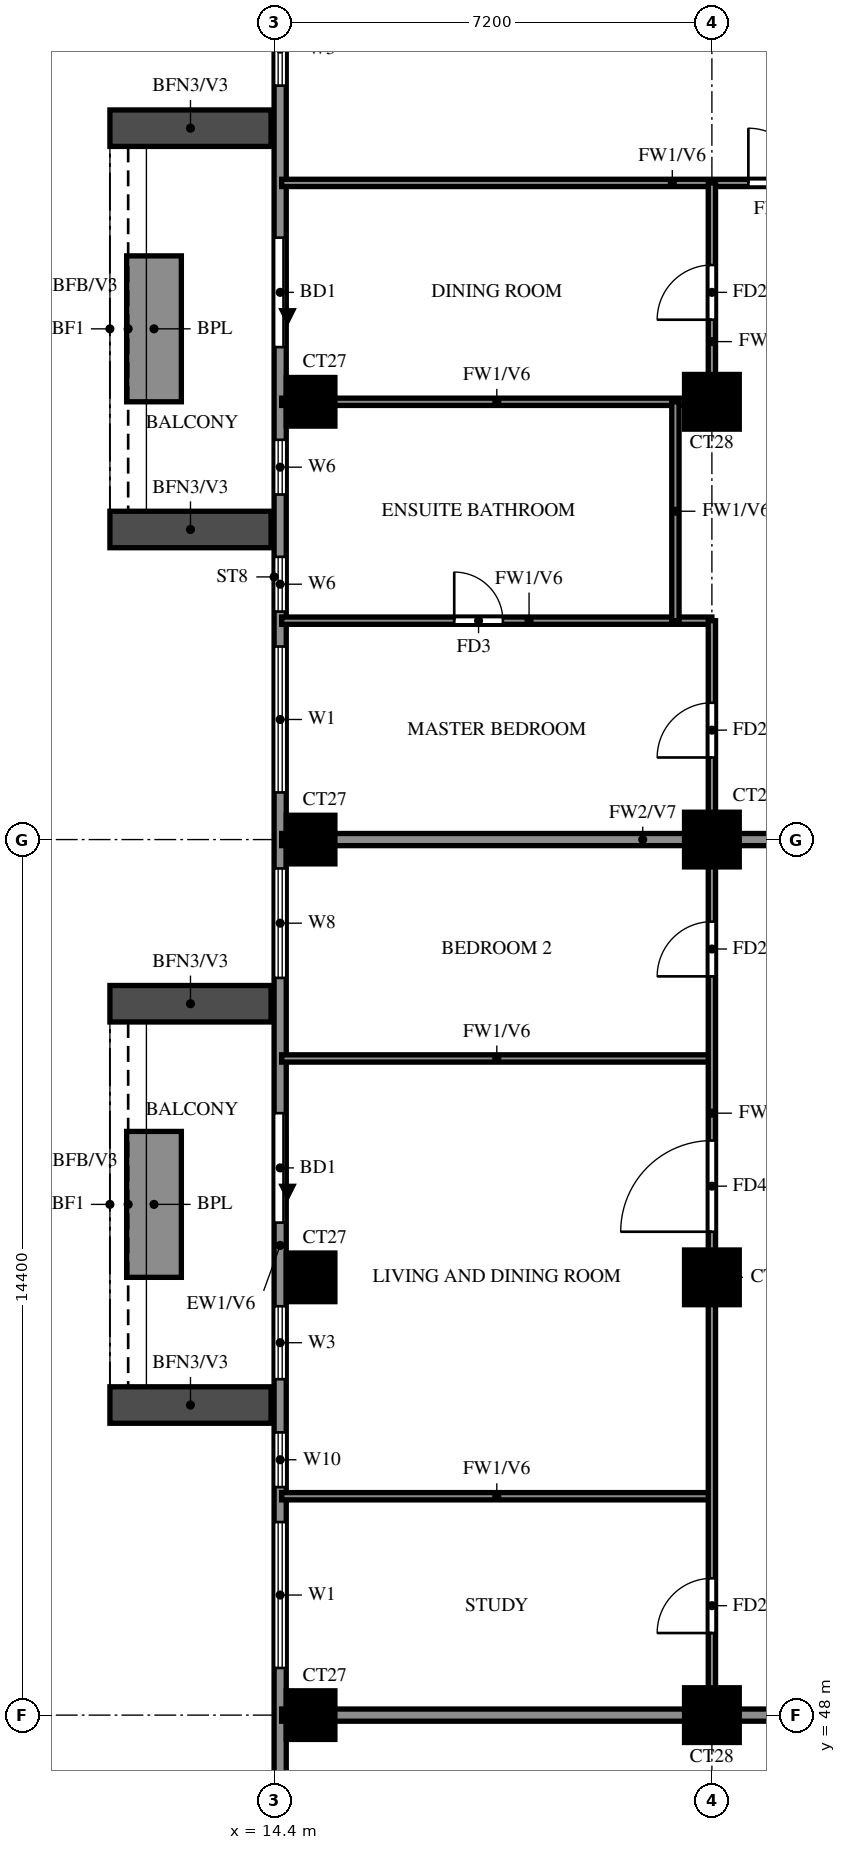
"""IFC4 building model, lengths in metres.
Left out: names, types, materials, properties, quantities, classifications, styles, units other than length and angle.
Written with IfcOpenShell. Run it as: python <this file> out.ifc"""

import sys

from ifc_helpers import new_model, si_unit, direction, frame, frame_2d, origin, origin_2d, place, context, subcontext, project, spatial, rectangle, extrude, source, transform, mapped, element, fill, save


model = new_model("IFC4")
c1 = context("Model", 3, precision=1e-05, world=origin(), true_north=direction((0.0, 1.0)))
c2 = subcontext(c1, "Body", "Model", "MODEL_VIEW")
j1 = project(units=[si_unit("LENGTHUNIT", "METRE"), si_unit("PLANEANGLEUNIT", "RADIAN")], contexts=[c1])
p1 = place(None, origin())
s1 = spatial("IfcSite", under=j1, at=p1, CompositionType="ELEMENT")
p2 = place(p1, origin())
s2 = spatial("IfcBuilding", under=s1, at=p2, CompositionType="ELEMENT")
p3 = place(p2, frame((0.0, 0.0, 202.5)))
s3 = spatial("IfcBuildingStorey", under=s2, at=p3, CompositionType="ELEMENT", Elevation=202.5)
m1 = source(origin(), c2, "Body", "SweptSolid", [
    extrude(rectangle(XDim=0.8, YDim=0.8, at=origin_2d()), origin(), (0.0, 0.0, 1.0), 3.1),
])
p4 = place(p3, frame((15.0, 48.0, 0.0), z_axis=(0.0, 0.0, 1.0), x_axis=(1.0, 0.0, 0.0)))
e1 = element("IfcColumn", 1, at=p4, inside=s3, PredefinedType="COLUMN", context=c2, shape_type="MappedRepresentation", body=[
    mapped(m1, transform((0.0, 0.0, 0.0))),
])
m2 = source(origin(), c2, "Body", "SweptSolid", [
    extrude(rectangle(XDim=0.9, YDim=0.9, at=origin_2d()), origin(), (0.0, 0.0, 1.0), 3.1),
])
p5 = place(p3, frame((21.6, 48.0, 0.0), z_axis=(0.0, 0.0, 1.0), x_axis=(1.0, 0.0, 0.0)))
e2 = element("IfcColumn", 2, at=p5, inside=s3, PredefinedType="COLUMN", context=c2, shape_type="MappedRepresentation", body=[
    mapped(m2, transform((0.0, 0.0, 0.0))),
])
p6 = place(p3, frame((15.0, 55.2, 0.0), z_axis=(0.0, 0.0, 1.0), x_axis=(1.0, 0.0, 0.0)))
e3 = element("IfcColumn", 3, at=p6, inside=s3, PredefinedType="COLUMN", context=c2, shape_type="MappedRepresentation", body=[
    mapped(m1, transform((0.0, 0.0, 0.0))),
])
p7 = place(p3, frame((21.6, 55.2, 0.0), z_axis=(0.0, 0.0, 1.0), x_axis=(1.0, 0.0, 0.0)))
e4 = element("IfcColumn", 4, at=p7, inside=s3, PredefinedType="COLUMN", context=c2, shape_type="MappedRepresentation", body=[
    mapped(m2, transform((0.0, 0.0, 0.0))),
])
p8 = place(p3, frame((15.0, 62.4, 0.0), z_axis=(0.0, 0.0, 1.0), x_axis=(1.0, 0.0, 0.0)))
e5 = element("IfcColumn", 5, at=p8, inside=s3, PredefinedType="COLUMN", context=c2, shape_type="MappedRepresentation", body=[
    mapped(m1, transform((0.0, 0.0, 0.0))),
])
p9 = place(p3, frame((21.6, 62.4, 0.0), z_axis=(0.0, 0.0, 1.0), x_axis=(1.0, 0.0, 0.0)))
e6 = element("IfcColumn", 6, at=p9, inside=s3, PredefinedType="COLUMN", context=c2, shape_type="MappedRepresentation", body=[
    mapped(m2, transform((0.0, 0.0, 0.0))),
])
p10 = place(p3, frame((15.0, 69.6, 0.0), z_axis=(0.0, 0.0, 1.0), x_axis=(1.0, 0.0, 0.0)))
e7 = element("IfcColumn", 7, at=p10, inside=s3, PredefinedType="COLUMN", context=c2, shape_type="MappedRepresentation", body=[
    mapped(m1, transform((0.0, 0.0, 0.0))),
])
p11 = place(p3, frame((21.6, 69.6, 0.0), z_axis=(0.0, 0.0, 1.0), x_axis=(1.0, 0.0, 0.0)))
e8 = element("IfcColumn", 8, at=p11, inside=s3, PredefinedType="COLUMN", context=c2, shape_type="MappedRepresentation", body=[
    mapped(m2, transform((0.0, 0.0, 0.0))),
])
p12 = place(p3, frame((14.5, 76.6, 0.0), z_axis=(0.0, 0.0, 1.0), x_axis=(0.0, -1.0, 0.0)))
e9 = element("IfcWall", 9, at=p12, inside=s3, PredefinedType="SOLIDWALL", context=c2, shape_type="SweptSolid", body=[
    extrude(rectangle(XDim=33.4, YDim=0.2, at=frame_2d((16.7, 0.0))), origin(), (0.0, 0.0, 1.0), 3.1),
])
p13 = place(p12, frame((4.3, 0.0, 0.0)))
e10 = element("IfcOpeningElement", 10, at=p13, cuts=e9, PredefinedType="OPENING", context=c2, shape_type="SweptSolid", body=[
    extrude(rectangle(XDim=1.8, YDim=2.4, at=frame_2d((0.9, 1.2))), frame((0.0, 0.11, 0.0), z_axis=(0.0, -1.0, 0.0), x_axis=(1.0, 0.0, 0.0)), (0.0, 0.0, 1.0), 0.22),
])
p14 = place(p12, frame((18.7, 0.0, 0.0)))
e11 = element("IfcOpeningElement", 11, at=p14, cuts=e9, PredefinedType="OPENING", context=c2, shape_type="SweptSolid", body=[
    extrude(rectangle(XDim=1.8, YDim=2.4, at=frame_2d((0.9, 1.2))), frame((0.0, 0.11, 0.0), z_axis=(0.0, -1.0, 0.0), x_axis=(1.0, 0.0, 0.0)), (0.0, 0.0, 1.0), 0.22),
])
p15 = place(p12, frame((29.875, 0.0, 0.6)))
e12 = element("IfcOpeningElement", 12, at=p15, cuts=e9, PredefinedType="OPENING", context=c2, shape_type="SweptSolid", body=[
    extrude(rectangle(XDim=2.4, YDim=2.4, at=frame_2d((1.2, 1.2))), frame((0.0, 0.11, 0.0), z_axis=(0.0, -1.0, 0.0), x_axis=(1.0, 0.0, 0.0)), (0.0, 0.0, 1.0), 0.22),
])
p16 = place(p12, frame((25.425, 0.0, 0.6)))
e13 = element("IfcOpeningElement", 13, at=p16, cuts=e9, PredefinedType="OPENING", context=c2, shape_type="SweptSolid", body=[
    extrude(rectangle(XDim=2.4, YDim=2.4, at=frame_2d((1.2, 1.2))), frame((0.0, 0.11, 0.0), z_axis=(0.0, -1.0, 0.0), x_axis=(1.0, 0.0, 0.0)), (0.0, 0.0, 1.0), 0.22),
])
p17 = place(p12, frame((21.875, 0.0, 0.6)))
e14 = element("IfcOpeningElement", 14, at=p17, cuts=e9, PredefinedType="OPENING", context=c2, shape_type="SweptSolid", body=[
    extrude(rectangle(XDim=1.2, YDim=2.4, at=frame_2d((0.6, 1.2))), frame((0.0, 0.11, 0.0), z_axis=(0.0, -1.0, 0.0), x_axis=(1.0, 0.0, 0.0)), (0.0, 0.0, 1.0), 0.22),
])
p18 = place(p12, frame((23.95, 0.0, 0.6)))
e15 = element("IfcOpeningElement", 15, at=p18, cuts=e9, PredefinedType="OPENING", context=c2, shape_type="SweptSolid", body=[
    extrude(rectangle(XDim=0.9, YDim=2.4, at=frame_2d((0.45, 1.2))), frame((0.0, 0.11, 0.0), z_axis=(0.0, -1.0, 0.0), x_axis=(1.0, 0.0, 0.0)), (0.0, 0.0, 1.0), 0.22),
])
p19 = place(p12, frame((14.675, 0.0, 0.6)))
e16 = element("IfcOpeningElement", 16, at=p19, cuts=e9, PredefinedType="OPENING", context=c2, shape_type="SweptSolid", body=[
    extrude(rectangle(XDim=1.8, YDim=2.4, at=frame_2d((0.9, 1.2))), frame((0.0, 0.11, 0.0), z_axis=(0.0, -1.0, 0.0), x_axis=(1.0, 0.0, 0.0)), (0.0, 0.0, 1.0), 0.22),
])
p20 = place(p12, frame((11.025, 0.0, 0.6)))
e17 = element("IfcOpeningElement", 17, at=p20, cuts=e9, PredefinedType="OPENING", context=c2, shape_type="SweptSolid", body=[
    extrude(rectangle(XDim=2.4, YDim=2.4, at=frame_2d((1.2, 1.2))), frame((0.0, 0.11, 0.0), z_axis=(0.0, -1.0, 0.0), x_axis=(1.0, 0.0, 0.0)), (0.0, 0.0, 1.0), 0.22),
])
p21 = place(p12, frame((7.625, 0.0, 1.5)))
e18 = element("IfcOpeningElement", 18, at=p21, cuts=e9, PredefinedType="OPENING", context=c2, shape_type="SweptSolid", body=[
    extrude(rectangle(XDim=0.9, YDim=0.9, at=frame_2d((0.45, 0.45))), frame((0.0, 0.11, 0.0), z_axis=(0.0, -1.0, 0.0), x_axis=(1.0, 0.0, 0.0)), (0.0, 0.0, 1.0), 0.22),
])
p22 = place(p12, frame((9.55, 0.0, 1.5)))
e19 = element("IfcOpeningElement", 19, at=p22, cuts=e9, PredefinedType="OPENING", context=c2, shape_type="SweptSolid", body=[
    extrude(rectangle(XDim=0.9, YDim=0.9, at=frame_2d((0.45, 0.45))), frame((0.0, 0.11, 0.0), z_axis=(0.0, -1.0, 0.0), x_axis=(1.0, 0.0, 0.0)), (0.0, 0.0, 1.0), 0.22),
])
p23 = place(p12, frame((0.6, 0.0, 0.6)))
e20 = element("IfcOpeningElement", 20, at=p23, cuts=e9, PredefinedType="OPENING", context=c2, shape_type="SweptSolid", body=[
    extrude(rectangle(XDim=1.2, YDim=2.4, at=frame_2d((0.6, 1.2))), frame((0.0, 0.11, 0.0), z_axis=(0.0, -1.0, 0.0), x_axis=(1.0, 0.0, 0.0)), (0.0, 0.0, 1.0), 0.22),
])
for number, where, z_axis, x_axis in (
    (21, (14.35, 74.1, 0.0), (0.0, 0.0, 1.0), (-1.0, 0.0, 0.0)),
    (22, (14.35, 67.5, 0.0), (0.0, 0.0, 1.0), (-1.0, 0.0, 0.0)),
):
    element("IfcWall", number, at=place(p3, frame(where, z_axis=z_axis, x_axis=x_axis)), inside=s3, PredefinedType="SOLIDWALL", context=c2, shape_type="SweptSolid", body=[
        extrude(rectangle(XDim=2.65, YDim=0.6, at=frame_2d((1.325, 0.0))), origin(), (0.0, 0.0, 1.0), 2.75),
    ])
p24 = place(p3, frame((12.425, 72.0, 0.0), z_axis=(0.0, 0.0, 1.0), x_axis=(0.0, -1.0, 0.0)))
e23 = element("IfcWall", 23, at=p24, inside=s3, PredefinedType="SOLIDWALL", context=c2, shape_type="SweptSolid", body=[
    extrude(rectangle(XDim=2.4, YDim=0.9, at=frame_2d((1.2, 0.0))), origin(), (0.0, 0.0, 1.0), 0.9),
])
for number, where, z_axis, x_axis in (
    (24, (14.35, 59.7, 0.0), (0.0, 0.0, 1.0), (-1.0, 0.0, 0.0)),
    (25, (14.35, 53.1, 0.0), (0.0, 0.0, 1.0), (-1.0, 0.0, 0.0)),
):
    element("IfcWall", number, at=place(p3, frame(where, z_axis=z_axis, x_axis=x_axis)), inside=s3, PredefinedType="SOLIDWALL", context=c2, shape_type="SweptSolid", body=[
        extrude(rectangle(XDim=2.65, YDim=0.6, at=frame_2d((1.325, 0.0))), origin(), (0.0, 0.0, 1.0), 2.75),
    ])
p25 = place(p3, frame((12.425, 57.6, 0.0), z_axis=(0.0, 0.0, 1.0), x_axis=(0.0, -1.0, 0.0)))
e26 = element("IfcWall", 26, at=p25, inside=s3, PredefinedType="SOLIDWALL", context=c2, shape_type="SweptSolid", body=[
    extrude(rectangle(XDim=2.4, YDim=0.9, at=frame_2d((1.2, 0.0))), origin(), (0.0, 0.0, 1.0), 0.9),
])
p26 = place(p3, frame((14.525, 48.0, 0.0), z_axis=(0.0, 0.0, 1.0), x_axis=(1.0, 0.0, 0.0)))
e27 = element("IfcWall", 27, at=p26, inside=s3, PredefinedType="SOLIDWALL", context=c2, shape_type="SweptSolid", body=[
    extrude(rectangle(XDim=19.075, YDim=0.2, at=frame_2d((9.538, 0.0))), origin(), (0.0, 0.0, 1.0), 3.1),
])
p27 = place(p3, frame((14.525, 62.4, 0.0), z_axis=(0.0, 0.0, 1.0), x_axis=(1.0, 0.0, 0.0)))
e28 = element("IfcWall", 28, at=p27, inside=s3, PredefinedType="SOLIDWALL", context=c2, shape_type="SweptSolid", body=[
    extrude(rectangle(XDim=11.875, YDim=0.2, at=frame_2d((5.938, 0.0))), origin(), (0.0, 0.0, 1.0), 3.1),
])
for number, where, z_axis, x_axis in (
    (29, (14.525, 51.6, 0.0), (0.0, 0.0, 1.0), (1.0, 0.0, 0.0)),
    (30, (14.525, 58.8, 0.0), (0.0, 0.0, 1.0), (1.0, 0.0, 0.0)),
):
    element("IfcWall", number, at=place(p3, frame(where, z_axis=z_axis, x_axis=x_axis)), inside=s3, PredefinedType="PARTITIONING", context=c2, shape_type="SweptSolid", body=[
        extrude(rectangle(XDim=7.075, YDim=0.12, at=frame_2d((3.538, 0.0))), origin(), (0.0, 0.0, 1.0), 3.1),
    ])
p28 = place(p3, frame((14.525, 66.0, 0.0), z_axis=(0.0, 0.0, 1.0), x_axis=(1.0, 0.0, 0.0)))
e31 = element("IfcWall", 31, at=p28, inside=s3, PredefinedType="PARTITIONING", context=c2, shape_type="SweptSolid", body=[
    extrude(rectangle(XDim=7.075, YDim=0.12, at=frame_2d((3.538, 0.0))), origin(), (0.0, 0.0, 1.0), 3.1),
])
p29 = place(p28, frame((2.837, 0.0, 0.0)))
e32 = element("IfcOpeningElement", 32, at=p29, cuts=e31, PredefinedType="OPENING", context=c2, shape_type="SweptSolid", body=[
    extrude(rectangle(XDim=0.8, YDim=2.1, at=frame_2d((0.4, 1.05))), frame((0.0, 0.07, 0.0), z_axis=(0.0, -1.0, 0.0), x_axis=(1.0, 0.0, 0.0)), (0.0, 0.0, 1.0), 0.14),
])
p30 = place(p3, frame((14.525, 69.6, 0.0), z_axis=(0.0, 0.0, 1.0), x_axis=(1.0, 0.0, 0.0)))
e33 = element("IfcWall", 33, at=p30, inside=s3, PredefinedType="PARTITIONING", context=c2, shape_type="SweptSolid", body=[
    extrude(rectangle(XDim=7.075, YDim=0.12, at=frame_2d((3.538, 0.0))), origin(), (0.0, 0.0, 1.0), 3.1),
])
p31 = place(p3, frame((14.525, 73.2, 0.0), z_axis=(0.0, 0.0, 1.0), x_axis=(1.0, 0.0, 0.0)))
e34 = element("IfcWall", 34, at=p31, inside=s3, PredefinedType="PARTITIONING", context=c2, shape_type="SweptSolid", body=[
    extrude(rectangle(XDim=14.275, YDim=0.12, at=frame_2d((7.138, 0.0))), origin(), (0.0, 0.0, 1.0), 3.1),
])
p32 = place(p31, frame((7.675, 0.0, 0.0)))
e35 = element("IfcOpeningElement", 35, at=p32, cuts=e34, PredefinedType="OPENING", context=c2, shape_type="SweptSolid", body=[
    extrude(rectangle(XDim=0.9, YDim=2.1, at=frame_2d((0.45, 1.05))), frame((0.0, 0.07, 0.0), z_axis=(0.0, -1.0, 0.0), x_axis=(1.0, 0.0, 0.0)), (0.0, 0.0, 1.0), 0.14),
])
p33 = place(p3, frame((21.0, 66.0, 0.0), z_axis=(0.0, 0.0, 1.0), x_axis=(0.0, 1.0, 0.0)))
e36 = element("IfcWall", 36, at=p33, inside=s3, PredefinedType="PARTITIONING", context=c2, shape_type="SweptSolid", body=[
    extrude(rectangle(XDim=3.6, YDim=0.12, at=frame_2d((1.8, 0.0))), origin(), (0.0, 0.0, 1.0), 3.1),
])
p34 = place(p3, frame((21.6, 48.0, 0.0), z_axis=(0.0, 0.0, 1.0), x_axis=(0.0, 1.0, 0.0)))
e37 = element("IfcWall", 37, at=p34, inside=s3, PredefinedType="PARTITIONING", context=c2, shape_type="SweptSolid", body=[
    extrude(rectangle(XDim=18.0, YDim=0.12, at=frame_2d((9.0, 0.0))), origin(), (0.0, 0.0, 1.0), 3.1),
])
p35 = place(p34, frame((1.35, 0.0, 0.0)))
e38 = element("IfcOpeningElement", 38, at=p35, cuts=e37, PredefinedType="OPENING", context=c2, shape_type="SweptSolid", body=[
    extrude(rectangle(XDim=0.9, YDim=2.1, at=frame_2d((0.45, 1.05))), frame((0.0, 0.07, 0.0), z_axis=(0.0, -1.0, 0.0), x_axis=(1.0, 0.0, 0.0)), (0.0, 0.0, 1.0), 0.14),
])
p36 = place(p34, frame((7.95, 0.0, 0.0)))
e39 = element("IfcOpeningElement", 39, at=p36, cuts=e37, PredefinedType="OPENING", context=c2, shape_type="SweptSolid", body=[
    extrude(rectangle(XDim=1.5, YDim=2.1, at=frame_2d((0.75, 1.05))), frame((0.0, 0.07, 0.0), z_axis=(0.0, -1.0, 0.0), x_axis=(1.0, 0.0, 0.0)), (0.0, 0.0, 1.0), 0.14),
])
p37 = place(p34, frame((12.15, 0.0, 0.0)))
e40 = element("IfcOpeningElement", 40, at=p37, cuts=e37, PredefinedType="OPENING", context=c2, shape_type="SweptSolid", body=[
    extrude(rectangle(XDim=0.9, YDim=2.1, at=frame_2d((0.45, 1.05))), frame((0.0, 0.07, 0.0), z_axis=(0.0, -1.0, 0.0), x_axis=(1.0, 0.0, 0.0)), (0.0, 0.0, 1.0), 0.14),
])
p38 = place(p34, frame((15.75, 0.0, 0.0)))
e41 = element("IfcOpeningElement", 41, at=p38, cuts=e37, PredefinedType="OPENING", context=c2, shape_type="SweptSolid", body=[
    extrude(rectangle(XDim=0.9, YDim=2.1, at=frame_2d((0.45, 1.05))), frame((0.0, 0.07, 0.0), z_axis=(0.0, -1.0, 0.0), x_axis=(1.0, 0.0, 0.0)), (0.0, 0.0, 1.0), 0.14),
])
p39 = place(p3, frame((21.6, 69.6, 0.0), z_axis=(0.0, 0.0, 1.0), x_axis=(0.0, 1.0, 0.0)))
e42 = element("IfcWall", 42, at=p39, inside=s3, PredefinedType="PARTITIONING", context=c2, shape_type="SweptSolid", body=[
    extrude(rectangle(XDim=3.6, YDim=0.12, at=frame_2d((1.8, 0.0))), origin(), (0.0, 0.0, 1.0), 3.1),
])
p40 = place(p39, frame((1.35, 0.0, 0.0)))
e43 = element("IfcOpeningElement", 43, at=p40, cuts=e42, PredefinedType="OPENING", context=c2, shape_type="SweptSolid", body=[
    extrude(rectangle(XDim=0.9, YDim=2.1, at=frame_2d((0.45, 1.05))), frame((0.0, 0.07, 0.0), z_axis=(0.0, -1.0, 0.0), x_axis=(1.0, 0.0, 0.0)), (0.0, 0.0, 1.0), 0.14),
])
p41 = place(p13, origin())
e44 = element("IfcDoor", 44, at=p41, inside=s3, OperationType="DOUBLE_DOOR_SLIDING", PredefinedType="DOOR", context=c2, shape_type="SweptSolid", body=[
    extrude(rectangle(XDim=1.8, YDim=2.4, at=frame_2d((0.9, 1.2))), frame((0.0, 0.025, 0.0), z_axis=(0.0, -1.0, 0.0), x_axis=(1.0, 0.0, 0.0)), (0.0, 0.0, 1.0), 0.05),
])
fill(e10, e44)
p42 = place(p14, origin())
e45 = element("IfcDoor", 45, at=p42, inside=s3, OperationType="DOUBLE_DOOR_SLIDING", PredefinedType="DOOR", context=c2, shape_type="SweptSolid", body=[
    extrude(rectangle(XDim=1.8, YDim=2.4, at=frame_2d((0.9, 1.2))), frame((0.0, 0.025, 0.0), z_axis=(0.0, -1.0, 0.0), x_axis=(1.0, 0.0, 0.0)), (0.0, 0.0, 1.0), 0.05),
])
fill(e11, e45)
p43 = place(p16, origin())
e46 = element("IfcWindow", 46, at=p43, inside=s3, PartitioningType="DOUBLE_PANEL_VERTICAL", PredefinedType="WINDOW", context=c2, shape_type="SweptSolid", body=[
    extrude(rectangle(XDim=2.4, YDim=2.4, at=frame_2d((1.2, 1.2))), frame((0.0, 0.03, 0.0), z_axis=(0.0, -1.0, 0.0), x_axis=(1.0, 0.0, 0.0)), (0.0, 0.0, 1.0), 0.06),
])
fill(e13, e46)
p44 = place(p17, origin())
e47 = element("IfcWindow", 47, at=p44, inside=s3, PartitioningType="SINGLE_PANEL", PredefinedType="WINDOW", context=c2, shape_type="SweptSolid", body=[
    extrude(rectangle(XDim=1.2, YDim=2.4, at=frame_2d((0.6, 1.2))), frame((0.0, 0.03, 0.0), z_axis=(0.0, -1.0, 0.0), x_axis=(1.0, 0.0, 0.0)), (0.0, 0.0, 1.0), 0.06),
])
fill(e14, e47)
p45 = place(p18, origin())
e48 = element("IfcWindow", 48, at=p45, inside=s3, PartitioningType="SINGLE_PANEL", PredefinedType="WINDOW", context=c2, shape_type="SweptSolid", body=[
    extrude(rectangle(XDim=0.9, YDim=2.4, at=frame_2d((0.45, 1.2))), frame((0.0, 0.03, 0.0), z_axis=(0.0, -1.0, 0.0), x_axis=(1.0, 0.0, 0.0)), (0.0, 0.0, 1.0), 0.06),
])
fill(e15, e48)
p46 = place(p19, origin())
e49 = element("IfcWindow", 49, at=p46, inside=s3, PartitioningType="DOUBLE_PANEL_VERTICAL", PredefinedType="WINDOW", context=c2, shape_type="SweptSolid", body=[
    extrude(rectangle(XDim=1.8, YDim=2.4, at=frame_2d((0.9, 1.2))), frame((0.0, 0.03, 0.0), z_axis=(0.0, -1.0, 0.0), x_axis=(1.0, 0.0, 0.0)), (0.0, 0.0, 1.0), 0.06),
])
fill(e16, e49)
p47 = place(p20, origin())
e50 = element("IfcWindow", 50, at=p47, inside=s3, PartitioningType="DOUBLE_PANEL_VERTICAL", PredefinedType="WINDOW", context=c2, shape_type="SweptSolid", body=[
    extrude(rectangle(XDim=2.4, YDim=2.4, at=frame_2d((1.2, 1.2))), frame((0.0, 0.03, 0.0), z_axis=(0.0, -1.0, 0.0), x_axis=(1.0, 0.0, 0.0)), (0.0, 0.0, 1.0), 0.06),
])
fill(e17, e50)
p48 = place(p21, origin())
e51 = element("IfcWindow", 51, at=p48, inside=s3, PartitioningType="SINGLE_PANEL", PredefinedType="WINDOW", context=c2, shape_type="SweptSolid", body=[
    extrude(rectangle(XDim=0.9, YDim=0.9, at=frame_2d((0.45, 0.45))), frame((0.0, 0.03, 0.0), z_axis=(0.0, -1.0, 0.0), x_axis=(1.0, 0.0, 0.0)), (0.0, 0.0, 1.0), 0.06),
])
fill(e18, e51)
p49 = place(p22, origin())
e52 = element("IfcWindow", 52, at=p49, inside=s3, PartitioningType="SINGLE_PANEL", PredefinedType="WINDOW", context=c2, shape_type="SweptSolid", body=[
    extrude(rectangle(XDim=0.9, YDim=0.9, at=frame_2d((0.45, 0.45))), frame((0.0, 0.03, 0.0), z_axis=(0.0, -1.0, 0.0), x_axis=(1.0, 0.0, 0.0)), (0.0, 0.0, 1.0), 0.06),
])
fill(e19, e52)
p50 = place(p23, origin())
e53 = element("IfcWindow", 53, at=p50, inside=s3, PartitioningType="SINGLE_PANEL", PredefinedType="WINDOW", context=c2, shape_type="SweptSolid", body=[
    extrude(rectangle(XDim=1.2, YDim=2.4, at=frame_2d((0.6, 1.2))), frame((0.0, 0.03, 0.0), z_axis=(0.0, -1.0, 0.0), x_axis=(1.0, 0.0, 0.0)), (0.0, 0.0, 1.0), 0.06),
])
fill(e20, e53)
p51 = place(p35, origin())
e54 = element("IfcDoor", 54, at=p51, inside=s3, OperationType="SINGLE_SWING_LEFT", PredefinedType="DOOR", context=c2, shape_type="SweptSolid", body=[
    extrude(rectangle(XDim=0.9, YDim=2.1, at=frame_2d((0.45, 1.05))), frame((0.0, 0.025, 0.0), z_axis=(0.0, -1.0, 0.0), x_axis=(1.0, 0.0, 0.0)), (0.0, 0.0, 1.0), 0.05),
])
fill(e38, e54)
p52 = place(p36, origin())
e55 = element("IfcDoor", 55, at=p52, inside=s3, OperationType="SINGLE_SWING_RIGHT", PredefinedType="DOOR", context=c2, shape_type="SweptSolid", body=[
    extrude(rectangle(XDim=1.5, YDim=2.1, at=frame_2d((0.75, 1.05))), frame((0.0, 0.025, 0.0), z_axis=(0.0, -1.0, 0.0), x_axis=(1.0, 0.0, 0.0)), (0.0, 0.0, 1.0), 0.05),
])
fill(e39, e55)
p53 = place(p37, origin())
e56 = element("IfcDoor", 56, at=p53, inside=s3, OperationType="SINGLE_SWING_RIGHT", PredefinedType="DOOR", context=c2, shape_type="SweptSolid", body=[
    extrude(rectangle(XDim=0.9, YDim=2.1, at=frame_2d((0.45, 1.05))), frame((0.0, 0.025, 0.0), z_axis=(0.0, -1.0, 0.0), x_axis=(1.0, 0.0, 0.0)), (0.0, 0.0, 1.0), 0.05),
])
fill(e40, e56)
p54 = place(p38, origin())
e57 = element("IfcDoor", 57, at=p54, inside=s3, OperationType="SINGLE_SWING_LEFT", PredefinedType="DOOR", context=c2, shape_type="SweptSolid", body=[
    extrude(rectangle(XDim=0.9, YDim=2.1, at=frame_2d((0.45, 1.05))), frame((0.0, 0.025, 0.0), z_axis=(0.0, -1.0, 0.0), x_axis=(1.0, 0.0, 0.0)), (0.0, 0.0, 1.0), 0.05),
])
fill(e41, e57)
p55 = place(p29, origin())
e58 = element("IfcDoor", 58, at=p55, inside=s3, OperationType="SINGLE_SWING_LEFT", PredefinedType="DOOR", context=c2, shape_type="SweptSolid", body=[
    extrude(rectangle(XDim=0.8, YDim=2.1, at=frame_2d((0.4, 1.05))), frame((0.0, 0.025, 0.0), z_axis=(0.0, -1.0, 0.0), x_axis=(1.0, 0.0, 0.0)), (0.0, 0.0, 1.0), 0.05),
])
fill(e32, e58)
p56 = place(p40, origin())
e59 = element("IfcDoor", 59, at=p56, inside=s3, OperationType="SINGLE_SWING_RIGHT", PredefinedType="DOOR", context=c2, shape_type="SweptSolid", body=[
    extrude(rectangle(XDim=0.9, YDim=2.1, at=frame_2d((0.45, 1.05))), frame((0.0, 0.025, 0.0), z_axis=(0.0, -1.0, 0.0), x_axis=(1.0, 0.0, 0.0)), (0.0, 0.0, 1.0), 0.05),
])
fill(e43, e59)
p57 = place(p32, origin())
e60 = element("IfcDoor", 60, at=p57, inside=s3, OperationType="SINGLE_SWING_LEFT", PredefinedType="DOOR", context=c2, shape_type="SweptSolid", body=[
    extrude(rectangle(XDim=0.9, YDim=2.1, at=frame_2d((0.45, 1.05))), frame((0.0, 0.025, 0.0), z_axis=(0.0, -1.0, 0.0), x_axis=(1.0, 0.0, 0.0)), (0.0, 0.0, 1.0), 0.05),
])
fill(e35, e60)
save(model, sys.argv[1])
